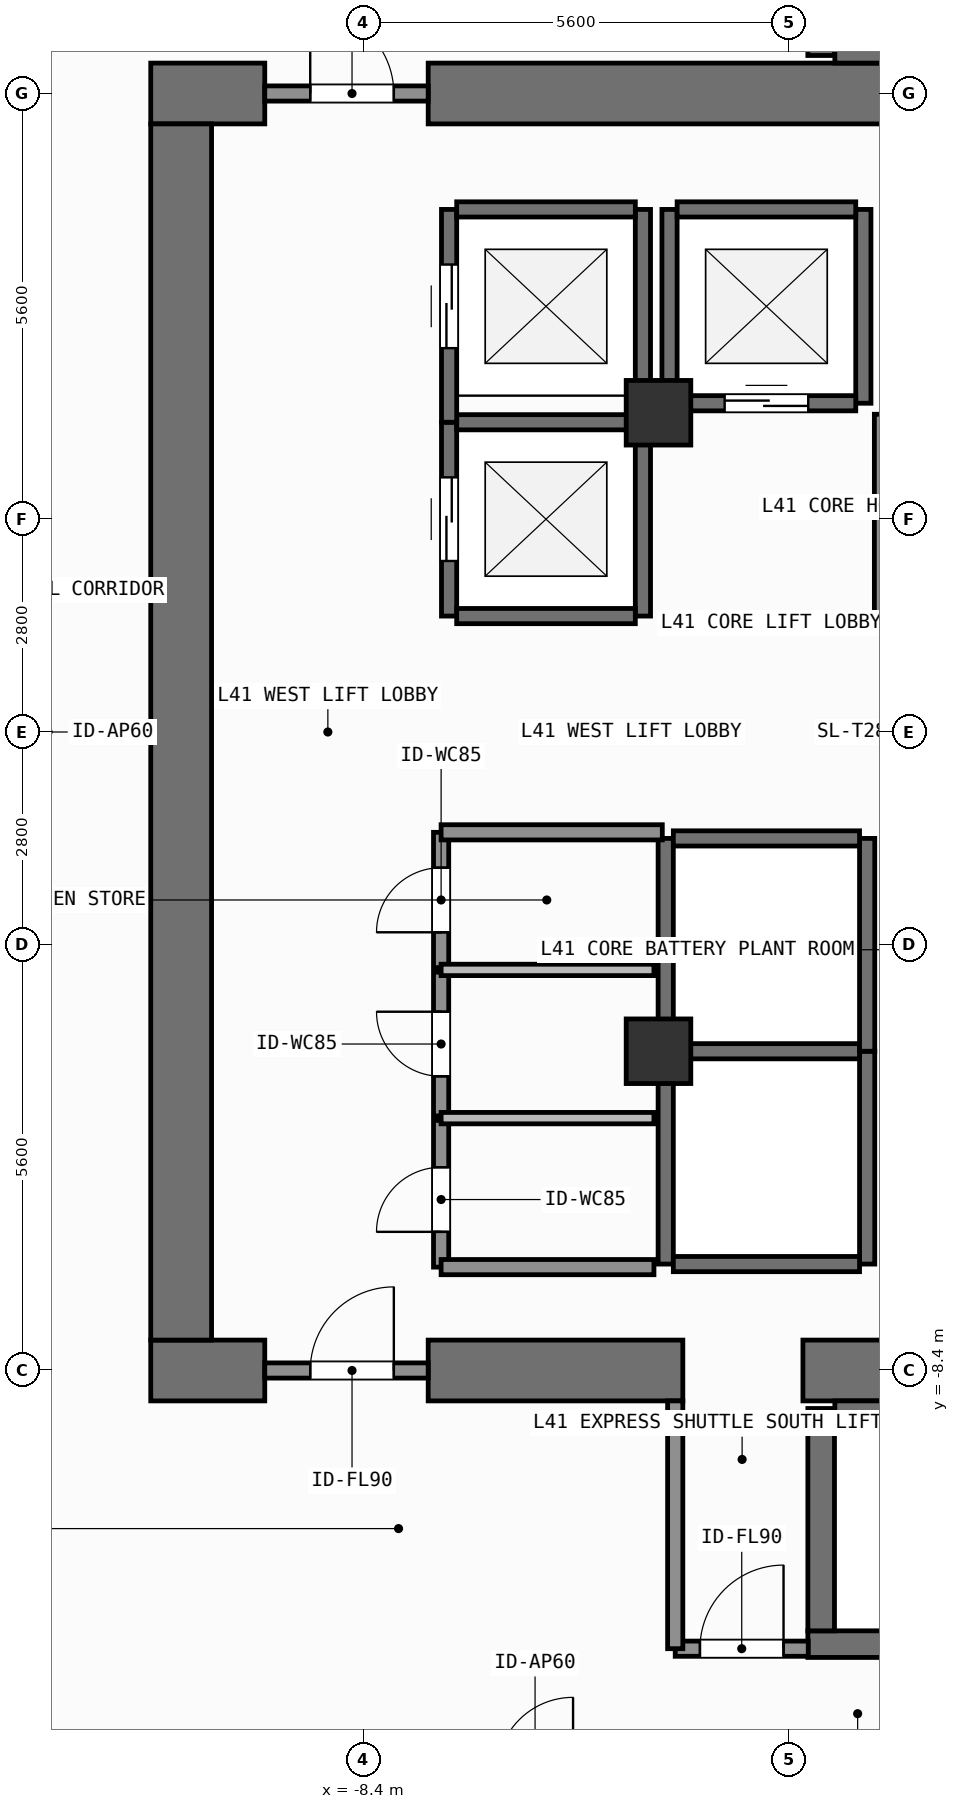
"""IFC4 building model, lengths in metres.
Left out: names, types, materials, properties, quantities, classifications, styles, units other than length and angle.
Written with IfcOpenShell. Run it as: python <this file> out.ifc"""

import sys

from ifc_helpers import new_model, si_unit, direction, frame, frame_2d, origin, origin_2d, place, context, subcontext, project, spatial, rectangle, extrude, element, fill, save


model = new_model("IFC4")
c1 = context("Model", 3, precision=1e-05, world=origin(), true_north=direction((0.0, 1.0)))
c2 = subcontext(c1, "Body", "Model", "MODEL_VIEW")
j1 = project(units=[si_unit("LENGTHUNIT", "METRE"), si_unit("PLANEANGLEUNIT", "RADIAN")], contexts=[c1])
p1 = place(None, origin())
s1 = spatial("IfcSite", under=j1, at=p1, CompositionType="ELEMENT")
p2 = place(p1, origin())
s2 = spatial("IfcBuilding", under=s1, at=p2, CompositionType="ELEMENT")
p3 = place(p2, frame((0.0, 0.0, 168.0)))
s3 = spatial("IfcBuildingStorey", under=s2, at=p3, CompositionType="ELEMENT", Elevation=168.0)
p4 = place(p3, frame((-11.2, -8.4, 0.0), z_axis=(0.0, 0.0, 1.0), x_axis=(1.0, 0.0, 0.0)))
e1 = element("IfcWall", 1, at=p4, inside=s3, PredefinedType="SHEAR", context=c2, shape_type="SweptSolid", body=[
    extrude(rectangle(XDim=1.5, YDim=0.8, at=frame_2d((0.75, 0.0))), origin(), (0.0, 0.0, 1.0), 3.9),
])
p5 = place(p3, frame((-7.55, -8.4, 0.0), z_axis=(0.0, 0.0, 1.0), x_axis=(1.0, 0.0, 0.0)))
e2 = element("IfcWall", 2, at=p5, inside=s3, PredefinedType="SHEAR", context=c2, shape_type="SweptSolid", body=[
    extrude(rectangle(XDim=3.35, YDim=0.8, at=frame_2d((1.675, 0.0))), origin(), (0.0, 0.0, 1.0), 3.9),
])
p6 = place(p3, frame((-2.62, -8.4, 0.0), z_axis=(0.0, 0.0, 1.0), x_axis=(1.0, 0.0, 0.0)))
e3 = element("IfcWall", 3, at=p6, inside=s3, PredefinedType="SHEAR", context=c2, shape_type="SweptSolid", body=[
    extrude(rectangle(XDim=7.27, YDim=0.8, at=frame_2d((3.635, 0.0))), origin(), (0.0, 0.0, 1.0), 3.9),
])
p7 = place(p3, frame((-11.2, 8.4, 0.0), z_axis=(0.0, 0.0, 1.0), x_axis=(1.0, 0.0, 0.0)))
e4 = element("IfcWall", 4, at=p7, inside=s3, PredefinedType="SHEAR", context=c2, shape_type="SweptSolid", body=[
    extrude(rectangle(XDim=1.5, YDim=0.8, at=frame_2d((0.75, 0.0))), origin(), (0.0, 0.0, 1.0), 3.9),
])
p8 = place(p3, frame((-7.55, 8.4, 0.0), z_axis=(0.0, 0.0, 1.0), x_axis=(1.0, 0.0, 0.0)))
e5 = element("IfcWall", 5, at=p8, inside=s3, PredefinedType="SHEAR", context=c2, shape_type="SweptSolid", body=[
    extrude(rectangle(XDim=16.35, YDim=0.8, at=frame_2d((8.175, 0.0))), origin(), (0.0, 0.0, 1.0), 3.9),
])
p9 = place(p3, frame((-10.8, -8.0, 0.0), z_axis=(0.0, 0.0, 1.0), x_axis=(0.0, 1.0, 0.0)))
e6 = element("IfcWall", 6, at=p9, inside=s3, PredefinedType="SHEAR", context=c2, shape_type="SweptSolid", body=[
    extrude(rectangle(XDim=16.0, YDim=0.8, at=frame_2d((8.0, 0.0))), origin(), (0.0, 0.0, 1.0), 3.9),
])
p10 = place(p3, frame((-2.555, -12.0, 0.0), z_axis=(0.0, 0.0, 1.0), x_axis=(1.0, 0.0, 0.0)))
e7 = element("IfcWall", 7, at=p10, inside=s3, PredefinedType="SHEAR", context=c2, shape_type="SweptSolid", body=[
    extrude(rectangle(XDim=7.31, YDim=0.35, at=frame_2d((3.655, 0.0))), origin(), (0.0, 0.0, 1.0), 3.9),
])
p11 = place(p3, frame((-2.2, -8.913, 0.0), z_axis=(0.0, 0.0, 1.0), x_axis=(1.0, 0.0, 0.0)))
e8 = element("IfcWall", 8, at=p11, inside=s3, PredefinedType="SHEAR", context=c2, shape_type="SweptSolid", body=[
    extrude(rectangle(XDim=6.6, YDim=0.225, at=frame_2d((3.3, 0.0))), origin(), (0.0, 0.0, 1.0), 3.9),
])
p12 = place(p3, frame((-2.38, -11.825, 0.0), z_axis=(0.0, 0.0, 1.0), x_axis=(0.0, 1.0, 0.0)))
e9 = element("IfcWall", 9, at=p12, inside=s3, PredefinedType="SHEAR", context=c2, shape_type="SweptSolid", body=[
    extrude(rectangle(XDim=2.925, YDim=0.35, at=frame_2d((1.462, 0.0))), origin(), (0.0, 0.0, 1.0), 3.9),
])
p13 = place(p3, frame((-2.2, 8.913, 0.0), z_axis=(0.0, 0.0, 1.0), x_axis=(1.0, 0.0, 0.0)))
e10 = element("IfcWall", 10, at=p13, inside=s3, PredefinedType="SHEAR", context=c2, shape_type="SweptSolid", body=[
    extrude(rectangle(XDim=6.6, YDim=0.225, at=frame_2d((3.3, 0.0))), origin(), (0.0, 0.0, 1.0), 3.9),
])
p14 = place(p3, frame((-2.38, 8.9, 0.0), z_axis=(0.0, 0.0, 1.0), x_axis=(0.0, 1.0, 0.0)))
e11 = element("IfcWall", 11, at=p14, inside=s3, PredefinedType="SHEAR", context=c2, shape_type="SweptSolid", body=[
    extrude(rectangle(XDim=2.925, YDim=0.35, at=frame_2d((1.462, 0.0))), origin(), (0.0, 0.0, 1.0), 3.9),
])
for number, where, z_axis, x_axis in (
    (12, (-4.52, -4.2, 0.0), (0.0, 0.0, 1.0), (1.0, 0.0, 0.0)),
    (13, (-4.52, 4.2, 0.0), (0.0, 0.0, 1.0), (1.0, 0.0, 0.0)),
):
    element("IfcColumn", number, at=place(p3, frame(where, z_axis=z_axis, x_axis=x_axis)), inside=s3, PredefinedType="COLUMN", context=c2, shape_type="SweptSolid", body=[
        extrude(rectangle(XDim=0.85, YDim=0.85, at=origin_2d()), origin(), (0.0, 0.0, 1.0), 3.9),
    ])
p15 = place(p3, frame((-7.275, 1.525, 0.0), z_axis=(0.0, 0.0, 1.0), x_axis=(0.0, 1.0, 0.0)))
e14 = element("IfcWall", 14, at=p15, inside=s3, PredefinedType="SHEAR", context=c2, shape_type="SweptSolid", body=[
    extrude(rectangle(XDim=2.55, YDim=0.2, at=frame_2d((1.275, 0.0))), origin(), (0.0, 0.0, 1.0), 3.68),
])
p16 = place(p15, frame((0.725, 0.0, 0.0)))
e15 = element("IfcOpeningElement", 15, at=p16, cuts=e14, PredefinedType="OPENING", context=c2, shape_type="SweptSolid", body=[
    extrude(rectangle(XDim=1.1, YDim=2.2, at=frame_2d((0.55, 1.1))), frame((0.0, 0.11, 0.0), z_axis=(0.0, -1.0, 0.0), x_axis=(1.0, 0.0, 0.0)), (0.0, 0.0, 1.0), 0.22),
])
p17 = place(p3, frame((-4.725, 1.525, 0.0), z_axis=(0.0, 0.0, 1.0), x_axis=(0.0, 1.0, 0.0)))
e16 = element("IfcWall", 16, at=p17, inside=s3, PredefinedType="SHEAR", context=c2, shape_type="SweptSolid", body=[
    extrude(rectangle(XDim=2.55, YDim=0.2, at=frame_2d((1.275, 0.0))), origin(), (0.0, 0.0, 1.0), 3.68),
])
for number, where, z_axis, x_axis in (
    (17, (-7.175, 1.525, 0.0), (0.0, 0.0, 1.0), (1.0, 0.0, 0.0)),
    (18, (-7.175, 4.075, 0.0), (0.0, 0.0, 1.0), (1.0, 0.0, 0.0)),
):
    element("IfcWall", number, at=place(p3, frame(where, z_axis=z_axis, x_axis=x_axis)), inside=s3, PredefinedType="SHEAR", context=c2, shape_type="SweptSolid", body=[
        extrude(rectangle(XDim=2.35, YDim=0.2, at=frame_2d((1.175, 0.0))), origin(), (0.0, 0.0, 1.0), 3.68),
    ])
p18 = place(p3, frame((-7.275, 4.075, 0.0), z_axis=(0.0, 0.0, 1.0), x_axis=(0.0, 1.0, 0.0)))
e19 = element("IfcWall", 19, at=p18, inside=s3, PredefinedType="SHEAR", context=c2, shape_type="SweptSolid", body=[
    extrude(rectangle(XDim=2.8, YDim=0.2, at=frame_2d((1.4, 0.0))), origin(), (0.0, 0.0, 1.0), 3.68),
])
p19 = place(p18, frame((0.975, 0.0, 0.0)))
e20 = element("IfcOpeningElement", 20, at=p19, cuts=e19, PredefinedType="OPENING", context=c2, shape_type="SweptSolid", body=[
    extrude(rectangle(XDim=1.1, YDim=2.2, at=frame_2d((0.55, 1.1))), frame((0.0, 0.11, 0.0), z_axis=(0.0, -1.0, 0.0), x_axis=(1.0, 0.0, 0.0)), (0.0, 0.0, 1.0), 0.22),
])
p20 = place(p3, frame((-4.725, 4.075, 0.0), z_axis=(0.0, 0.0, 1.0), x_axis=(0.0, 1.0, 0.0)))
e21 = element("IfcWall", 21, at=p20, inside=s3, PredefinedType="SHEAR", context=c2, shape_type="SweptSolid", body=[
    extrude(rectangle(XDim=2.8, YDim=0.2, at=frame_2d((1.4, 0.0))), origin(), (0.0, 0.0, 1.0), 3.68),
])
p21 = place(p3, frame((-7.175, 6.875, 0.0), z_axis=(0.0, 0.0, 1.0), x_axis=(1.0, 0.0, 0.0)))
e22 = element("IfcWall", 22, at=p21, inside=s3, PredefinedType="SHEAR", context=c2, shape_type="SweptSolid", body=[
    extrude(rectangle(XDim=2.35, YDim=0.2, at=frame_2d((1.175, 0.0))), origin(), (0.0, 0.0, 1.0), 3.68),
])
for number, where, z_axis, x_axis in (
    (23, (-4.375, 4.325, 0.0), (0.0, 0.0, 1.0), (0.0, 1.0, 0.0)),
    (24, (-1.825, 4.325, 0.0), (0.0, 0.0, 1.0), (0.0, 1.0, 0.0)),
):
    element("IfcWall", number, at=place(p3, frame(where, z_axis=z_axis, x_axis=x_axis)), inside=s3, PredefinedType="SHEAR", context=c2, shape_type="SweptSolid", body=[
        extrude(rectangle(XDim=2.55, YDim=0.2, at=frame_2d((1.275, 0.0))), origin(), (0.0, 0.0, 1.0), 3.68),
    ])
p22 = place(p3, frame((-4.275, 4.325, 0.0), z_axis=(0.0, 0.0, 1.0), x_axis=(1.0, 0.0, 0.0)))
e25 = element("IfcWall", 25, at=p22, inside=s3, PredefinedType="SHEAR", context=c2, shape_type="SweptSolid", body=[
    extrude(rectangle(XDim=2.35, YDim=0.2, at=frame_2d((1.175, 0.0))), origin(), (0.0, 0.0, 1.0), 3.68),
])
p23 = place(p22, frame((0.625, 0.0, 0.0)))
e26 = element("IfcOpeningElement", 26, at=p23, cuts=e25, PredefinedType="OPENING", context=c2, shape_type="SweptSolid", body=[
    extrude(rectangle(XDim=1.1, YDim=2.2, at=frame_2d((0.55, 1.1))), frame((0.0, 0.11, 0.0), z_axis=(0.0, -1.0, 0.0), x_axis=(1.0, 0.0, 0.0)), (0.0, 0.0, 1.0), 0.22),
])
p24 = place(p3, frame((-4.275, 6.875, 0.0), z_axis=(0.0, 0.0, 1.0), x_axis=(1.0, 0.0, 0.0)))
e27 = element("IfcWall", 27, at=p24, inside=s3, PredefinedType="SHEAR", context=c2, shape_type="SweptSolid", body=[
    extrude(rectangle(XDim=2.35, YDim=0.2, at=frame_2d((1.175, 0.0))), origin(), (0.0, 0.0, 1.0), 3.68),
])
for number, where, z_axis, x_axis in (
    (28, (-4.425, -7.0, 0.0), (0.0, 0.0, 1.0), (0.0, 1.0, 0.0)),
    (29, (-1.775, -7.0, 0.0), (0.0, 0.0, 1.0), (0.0, 1.0, 0.0)),
):
    element("IfcWall", number, at=place(p3, frame(where, z_axis=z_axis, x_axis=x_axis)), inside=s3, PredefinedType="SHEAR", context=c2, shape_type="SweptSolid", body=[
        extrude(rectangle(XDim=2.8, YDim=0.2, at=frame_2d((1.4, 0.0))), origin(), (0.0, 0.0, 1.0), 3.68),
    ])
for number, where, z_axis, x_axis in (
    (30, (-4.325, -7.0, 0.0), (0.0, 0.0, 1.0), (1.0, 0.0, 0.0)),
    (31, (-4.325, -4.2, 0.0), (0.0, 0.0, 1.0), (1.0, 0.0, 0.0)),
):
    element("IfcWall", number, at=place(p3, frame(where, z_axis=z_axis, x_axis=x_axis)), inside=s3, PredefinedType="SHEAR", context=c2, shape_type="SweptSolid", body=[
        extrude(rectangle(XDim=2.45, YDim=0.2, at=frame_2d((1.225, 0.0))), origin(), (0.0, 0.0, 1.0), 3.68),
    ])
for number, where, z_axis, x_axis in (
    (32, (-4.425, -4.2, 0.0), (0.0, 0.0, 1.0), (0.0, 1.0, 0.0)),
    (33, (-1.775, -4.2, 0.0), (0.0, 0.0, 1.0), (0.0, 1.0, 0.0)),
):
    element("IfcWall", number, at=place(p3, frame(where, z_axis=z_axis, x_axis=x_axis)), inside=s3, PredefinedType="SHEAR", context=c2, shape_type="SweptSolid", body=[
        extrude(rectangle(XDim=2.8, YDim=0.2, at=frame_2d((1.4, 0.0))), origin(), (0.0, 0.0, 1.0), 3.68),
    ])
p25 = place(p3, frame((-4.325, -1.4, 0.0), z_axis=(0.0, 0.0, 1.0), x_axis=(1.0, 0.0, 0.0)))
e34 = element("IfcWall", 34, at=p25, inside=s3, PredefinedType="SHEAR", context=c2, shape_type="SweptSolid", body=[
    extrude(rectangle(XDim=2.45, YDim=0.2, at=frame_2d((1.225, 0.0))), origin(), (0.0, 0.0, 1.0), 3.68),
])
p26 = place(p3, frame((-9.7, -8.4, 0.0), z_axis=(0.0, 0.0, 1.0), x_axis=(1.0, 0.0, 0.0)))
e35 = element("IfcWall", 35, at=p26, inside=s3, PredefinedType="SOLIDWALL", context=c2, shape_type="SweptSolid", body=[
    extrude(rectangle(XDim=2.15, YDim=0.2, at=frame_2d((1.075, 0.0))), origin(), (0.0, 0.0, 1.0), 2.82),
])
p27 = place(p26, frame((0.598, 0.0, 0.0)))
e36 = element("IfcOpeningElement", 36, at=p27, cuts=e35, PredefinedType="OPENING", context=c2, shape_type="SweptSolid", body=[
    extrude(rectangle(XDim=1.1, YDim=2.15, at=frame_2d((0.55, 1.075))), frame((0.0, 0.11, 0.0), z_axis=(0.0, -1.0, 0.0), x_axis=(1.0, 0.0, 0.0)), (0.0, 0.0, 1.0), 0.22),
])
p28 = place(p3, frame((-9.7, 8.4, 0.0), z_axis=(0.0, 0.0, 1.0), x_axis=(1.0, 0.0, 0.0)))
e37 = element("IfcWall", 37, at=p28, inside=s3, PredefinedType="SOLIDWALL", context=c2, shape_type="SweptSolid", body=[
    extrude(rectangle(XDim=2.15, YDim=0.2, at=frame_2d((1.075, 0.0))), origin(), (0.0, 0.0, 1.0), 2.82),
])
p29 = place(p28, frame((0.598, 0.0, 0.0)))
e38 = element("IfcOpeningElement", 38, at=p29, cuts=e37, PredefinedType="OPENING", context=c2, shape_type="SweptSolid", body=[
    extrude(rectangle(XDim=1.1, YDim=2.15, at=frame_2d((0.55, 1.075))), frame((0.0, 0.11, 0.0), z_axis=(0.0, -1.0, 0.0), x_axis=(1.0, 0.0, 0.0)), (0.0, 0.0, 1.0), 0.22),
])
p30 = place(p3, frame((-4.3, -12.06, 0.0), z_axis=(0.0, 0.0, 1.0), x_axis=(1.0, 0.0, 0.0)))
e39 = element("IfcWall", 39, at=p30, inside=s3, PredefinedType="SOLIDWALL", context=c2, shape_type="SweptSolid", body=[
    extrude(rectangle(XDim=1.75, YDim=0.2, at=frame_2d((0.875, 0.0))), origin(), (0.0, 0.0, 1.0), 3.68),
])
p31 = place(p30, frame((0.325, 0.0, 0.0)))
e40 = element("IfcOpeningElement", 40, at=p31, cuts=e39, PredefinedType="OPENING", context=c2, shape_type="SweptSolid", body=[
    extrude(rectangle(XDim=1.1, YDim=2.15, at=frame_2d((0.55, 1.075))), frame((0.0, 0.11, 0.0), z_axis=(0.0, -1.0, 0.0), x_axis=(1.0, 0.0, 0.0)), (0.0, 0.0, 1.0), 0.22),
])
p32 = place(p3, frame((-7.38, -7.04, 0.0), z_axis=(0.0, 0.0, 1.0), x_axis=(0.0, 1.0, 0.0)))
e41 = element("IfcWall", 41, at=p32, inside=s3, PredefinedType="SOLIDWALL", context=c2, shape_type="SweptSolid", body=[
    extrude(rectangle(XDim=1.93, YDim=0.2, at=frame_2d((0.965, 0.0))), origin(), (0.0, 0.0, 1.0), 3.68),
])
p33 = place(p32, frame((0.464, 0.0, 0.0)))
e42 = element("IfcOpeningElement", 42, at=p33, cuts=e41, PredefinedType="OPENING", context=c2, shape_type="SweptSolid", body=[
    extrude(rectangle(XDim=0.85, YDim=2.1, at=frame_2d((0.425, 1.05))), frame((0.0, 0.11, 0.0), z_axis=(0.0, -1.0, 0.0), x_axis=(1.0, 0.0, 0.0)), (0.0, 0.0, 1.0), 0.22),
])
p34 = place(p3, frame((-7.38, -5.05, 0.0), z_axis=(0.0, 0.0, 1.0), x_axis=(0.0, 1.0, 0.0)))
e43 = element("IfcWall", 43, at=p34, inside=s3, PredefinedType="SOLIDWALL", context=c2, shape_type="SweptSolid", body=[
    extrude(rectangle(XDim=1.89, YDim=0.2, at=frame_2d((0.945, 0.0))), origin(), (0.0, 0.0, 1.0), 3.68),
])
p35 = place(p34, frame((0.52, 0.0, 0.0)))
e44 = element("IfcOpeningElement", 44, at=p35, cuts=e43, PredefinedType="OPENING", context=c2, shape_type="SweptSolid", body=[
    extrude(rectangle(XDim=0.85, YDim=2.1, at=frame_2d((0.425, 1.05))), frame((0.0, 0.11, 0.0), z_axis=(0.0, -1.0, 0.0), x_axis=(1.0, 0.0, 0.0)), (0.0, 0.0, 1.0), 0.22),
])
p36 = place(p3, frame((-7.38, -3.1, 0.0), z_axis=(0.0, 0.0, 1.0), x_axis=(0.0, 1.0, 0.0)))
e45 = element("IfcWall", 45, at=p36, inside=s3, PredefinedType="SOLIDWALL", context=c2, shape_type="SweptSolid", body=[
    extrude(rectangle(XDim=1.78, YDim=0.2, at=frame_2d((0.89, 0.0))), origin(), (0.0, 0.0, 1.0), 3.68),
])
p37 = place(p36, frame((0.465, 0.0, 0.0)))
e46 = element("IfcOpeningElement", 46, at=p37, cuts=e45, PredefinedType="OPENING", context=c2, shape_type="SweptSolid", body=[
    extrude(rectangle(XDim=0.85, YDim=2.1, at=frame_2d((0.425, 1.05))), frame((0.0, 0.11, 0.0), z_axis=(0.0, -1.0, 0.0), x_axis=(1.0, 0.0, 0.0)), (0.0, 0.0, 1.0), 0.22),
])
p38 = place(p3, frame((-4.3, -12.06, 0.0), z_axis=(0.0, 0.0, 1.0), x_axis=(0.0, 1.0, 0.0)))
e47 = element("IfcWall", 47, at=p38, inside=s3, PredefinedType="SOLIDWALL", context=c2, shape_type="SweptSolid", body=[
    extrude(rectangle(XDim=3.26, YDim=0.2, at=frame_2d((1.63, 0.0))), origin(), (0.0, 0.0, 1.0), 3.68),
])
p39 = place(p3, frame((-7.38, -1.32, 0.0), z_axis=(0.0, 0.0, 1.0), x_axis=(1.0, 0.0, 0.0)))
e48 = element("IfcWall", 48, at=p39, inside=s3, PredefinedType="SOLIDWALL", context=c2, shape_type="SweptSolid", body=[
    extrude(rectangle(XDim=2.91, YDim=0.2, at=frame_2d((1.455, 0.0))), origin(), (0.0, 0.0, 1.0), 3.68),
])
p40 = place(p3, frame((-1.58, 1.48, 0.0), z_axis=(0.0, 0.0, 1.0), x_axis=(0.0, 1.0, 0.0)))
e49 = element("IfcWall", 49, at=p40, inside=s3, PredefinedType="SOLIDWALL", context=c2, shape_type="SweptSolid", body=[
    extrude(rectangle(XDim=2.7, YDim=0.2, at=frame_2d((1.35, 0.0))), origin(), (0.0, 0.0, 1.0), 3.68),
])
p41 = place(p3, frame((-7.38, -7.04, 0.0), z_axis=(0.0, 0.0, 1.0), x_axis=(1.0, 0.0, 0.0)))
e50 = element("IfcWall", 50, at=p41, inside=s3, PredefinedType="SOLIDWALL", context=c2, shape_type="SweptSolid", body=[
    extrude(rectangle(XDim=2.8, YDim=0.2, at=frame_2d((1.4, 0.0))), origin(), (0.0, 0.0, 1.0), 3.68),
])
for number, where, z_axis, x_axis in (
    (51, (-7.38, -5.08, 0.0), (0.0, 0.0, 1.0), (1.0, 0.0, 0.0)),
    (52, (-7.38, -3.13, 0.0), (0.0, 0.0, 1.0), (1.0, 0.0, 0.0)),
):
    element("IfcWall", number, at=place(p3, frame(where, z_axis=z_axis, x_axis=x_axis)), inside=s3, PredefinedType="PARTITIONING", context=c2, shape_type="SweptSolid", body=[
        extrude(rectangle(XDim=2.8, YDim=0.15, at=frame_2d((1.4, 0.0))), origin(), (0.0, 0.0, 1.0), 3.68),
    ])
p42 = place(p16, origin())
e53 = element("IfcDoor", 53, at=p42, inside=s3, OperationType="SLIDING_TO_LEFT", PredefinedType="DOOR", context=c2, shape_type="SweptSolid", body=[
    extrude(rectangle(XDim=1.1, YDim=2.2, at=frame_2d((0.55, 1.1))), frame((0.0, 0.025, 0.0), z_axis=(0.0, -1.0, 0.0), x_axis=(1.0, 0.0, 0.0)), (0.0, 0.0, 1.0), 0.05),
])
fill(e15, e53)
p43 = place(p19, origin())
e54 = element("IfcDoor", 54, at=p43, inside=s3, OperationType="SLIDING_TO_LEFT", PredefinedType="DOOR", context=c2, shape_type="SweptSolid", body=[
    extrude(rectangle(XDim=1.1, YDim=2.2, at=frame_2d((0.55, 1.1))), frame((0.0, 0.025, 0.0), z_axis=(0.0, -1.0, 0.0), x_axis=(1.0, 0.0, 0.0)), (0.0, 0.0, 1.0), 0.05),
])
fill(e20, e54)
p44 = place(p23, origin())
e55 = element("IfcDoor", 55, at=p44, inside=s3, OperationType="SLIDING_TO_LEFT", PredefinedType="DOOR", context=c2, shape_type="SweptSolid", body=[
    extrude(rectangle(XDim=1.1, YDim=2.2, at=frame_2d((0.55, 1.1))), frame((0.0, 0.025, 0.0), z_axis=(0.0, -1.0, 0.0), x_axis=(1.0, 0.0, 0.0)), (0.0, 0.0, 1.0), 0.05),
])
fill(e26, e55)
p45 = place(p27, origin())
e56 = element("IfcDoor", 56, at=p45, inside=s3, OperationType="SINGLE_SWING_RIGHT", PredefinedType="DOOR", context=c2, shape_type="SweptSolid", body=[
    extrude(rectangle(XDim=1.1, YDim=2.15, at=frame_2d((0.55, 1.075))), frame((0.0, 0.025, 0.0), z_axis=(0.0, -1.0, 0.0), x_axis=(1.0, 0.0, 0.0)), (0.0, 0.0, 1.0), 0.05),
])
fill(e36, e56)
p46 = place(p29, origin())
e57 = element("IfcDoor", 57, at=p46, inside=s3, OperationType="SINGLE_SWING_LEFT", PredefinedType="DOOR", context=c2, shape_type="SweptSolid", body=[
    extrude(rectangle(XDim=1.1, YDim=2.15, at=frame_2d((0.55, 1.075))), frame((0.0, 0.025, 0.0), z_axis=(0.0, -1.0, 0.0), x_axis=(1.0, 0.0, 0.0)), (0.0, 0.0, 1.0), 0.05),
])
fill(e38, e57)
p47 = place(p31, origin())
e58 = element("IfcDoor", 58, at=p47, inside=s3, OperationType="SINGLE_SWING_RIGHT", PredefinedType="DOOR", context=c2, shape_type="SweptSolid", body=[
    extrude(rectangle(XDim=1.1, YDim=2.15, at=frame_2d((0.55, 1.075))), frame((0.0, 0.025, 0.0), z_axis=(0.0, -1.0, 0.0), x_axis=(1.0, 0.0, 0.0)), (0.0, 0.0, 1.0), 0.05),
])
fill(e40, e58)
p48 = place(p33, origin())
e59 = element("IfcDoor", 59, at=p48, inside=s3, OperationType="SINGLE_SWING_LEFT", PredefinedType="DOOR", context=c2, shape_type="SweptSolid", body=[
    extrude(rectangle(XDim=0.85, YDim=2.1, at=frame_2d((0.425, 1.05))), frame((0.0, 0.025, 0.0), z_axis=(0.0, -1.0, 0.0), x_axis=(1.0, 0.0, 0.0)), (0.0, 0.0, 1.0), 0.05),
])
fill(e42, e59)
p49 = place(p35, origin())
e60 = element("IfcDoor", 60, at=p49, inside=s3, OperationType="SINGLE_SWING_RIGHT", PredefinedType="DOOR", context=c2, shape_type="SweptSolid", body=[
    extrude(rectangle(XDim=0.85, YDim=2.1, at=frame_2d((0.425, 1.05))), frame((0.0, 0.025, 0.0), z_axis=(0.0, -1.0, 0.0), x_axis=(1.0, 0.0, 0.0)), (0.0, 0.0, 1.0), 0.05),
])
fill(e44, e60)
p50 = place(p37, origin())
e61 = element("IfcDoor", 61, at=p50, inside=s3, OperationType="SINGLE_SWING_LEFT", PredefinedType="DOOR", context=c2, shape_type="SweptSolid", body=[
    extrude(rectangle(XDim=0.85, YDim=2.1, at=frame_2d((0.425, 1.05))), frame((0.0, 0.025, 0.0), z_axis=(0.0, -1.0, 0.0), x_axis=(1.0, 0.0, 0.0)), (0.0, 0.0, 1.0), 0.05),
])
fill(e46, e61)
save(model, sys.argv[1])
